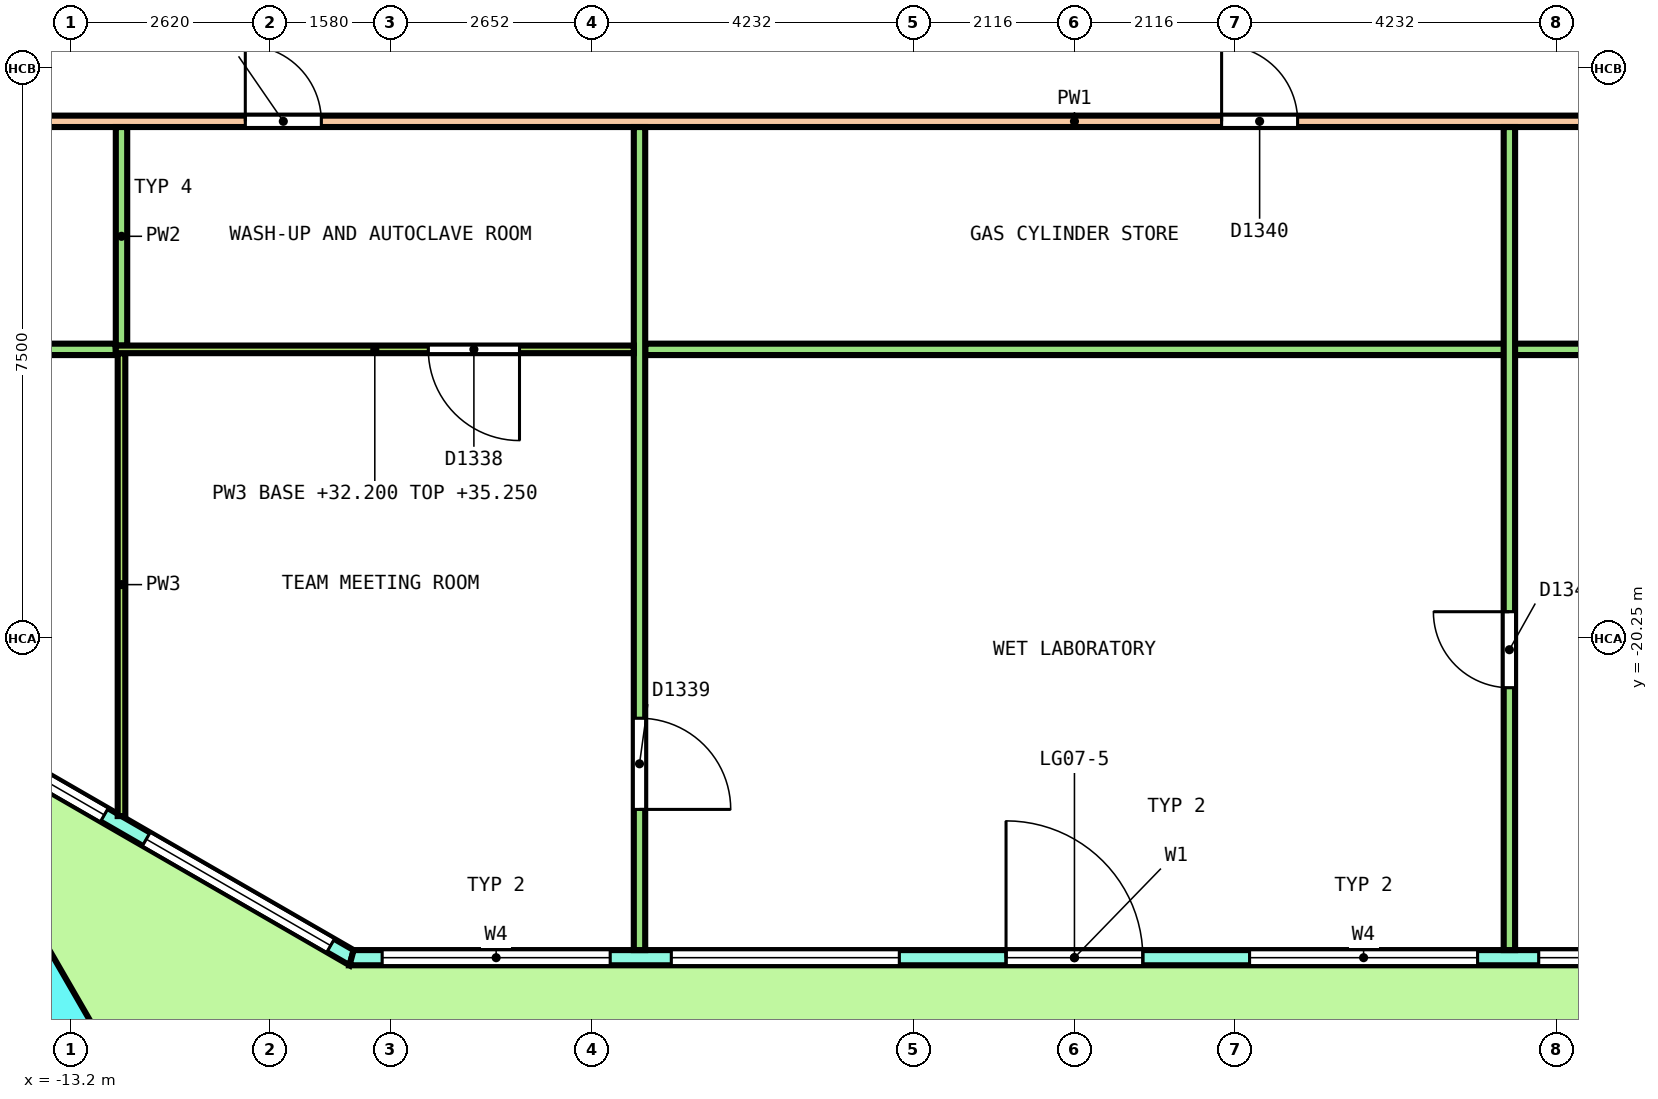
"""IFC4 building model, lengths in metres.
Left out: names, types, materials, properties, quantities, classifications, styles, units other than length and angle.
Written with IfcOpenShell. Run it as: python <this file> out.ifc"""

import sys

from ifc_helpers import new_model, si_unit, direction, frame, frame_2d, origin, origin_2d, place, context, subcontext, project, spatial, polyline, rectangle, outline, extrude, element, fill, save


model = new_model("IFC4")
c1 = context("Model", 3, precision=1e-05, world=origin(), true_north=direction((0.0, 1.0)))
c2 = subcontext(c1, "Body", "Model", "MODEL_VIEW")
j1 = project(units=[si_unit("LENGTHUNIT", "METRE"), si_unit("PLANEANGLEUNIT", "RADIAN")], contexts=[c1])
p1 = place(None, origin())
s1 = spatial("IfcSite", under=j1, at=p1, CompositionType="ELEMENT")
p2 = place(p1, origin())
s2 = spatial("IfcBuilding", under=s1, at=p2, CompositionType="ELEMENT")
p3 = place(p2, frame((0.0, 0.0, 32.2)))
s3 = spatial("IfcBuildingStorey", under=s2, at=p3, CompositionType="ELEMENT", Elevation=32.2)
p4 = place(p3, frame((-13.887, -25.159, 0.0), z_axis=(0.018132595726, -0.031445896907, 0.999340965106), x_axis=(0.865469370655, -0.499974541214, -0.031436071558)))
e1 = element("IfcColumn", 1, at=p4, inside=s3, PredefinedType="COLUMN", context=c2, shape_type="SweptSolid", body=[
    extrude(rectangle(XDim=1.5, YDim=1.5, at=origin_2d()), origin(), (0.0, 0.0, 1.0), 4.053),
])
p5 = place(p3, frame((-15.464, -21.016, 0.0), z_axis=(0.0, 0.0, 1.0), x_axis=(0.866029458321, -0.49999297727, 0.0)))
e2 = element("IfcWall", 2, at=p5, inside=s3, PredefinedType="SOLIDWALL", context=c2, shape_type="SweptSolid", body=[
    extrude(outline(polyline([(-0.027, -0.1), (1.128, -0.1), (2.282, -0.1), (3.437, -0.1), (4.592, -0.1), (5.747, -0.1), (6.901, -0.1), (6.848, 0.1), (5.711, 0.1), (4.574, 0.1), (3.437, 0.1), (2.301, 0.1), (1.164, 0.1), (0.027, 0.1), (-0.027, -0.1)])), origin(), (0.0, 0.0, 1.0), 4.1),
])
p6 = place(p5, frame((0.319, 0.0, 0.1)))
e3 = element("IfcOpeningElement", 3, at=p6, cuts=e2, PredefinedType="OPENING", context=c2, shape_type="SweptSolid", body=[
    extrude(rectangle(XDim=2.8, YDim=2.9, at=frame_2d((1.4, 1.45))), frame((0.0, 0.11, 0.0), z_axis=(0.0, -1.0, 0.0), x_axis=(1.0, 0.0, 0.0)), (0.0, 0.0, 1.0), 0.22),
])
p7 = place(p5, frame((3.756, 0.0, 0.1)))
e4 = element("IfcOpeningElement", 4, at=p7, cuts=e2, PredefinedType="OPENING", context=c2, shape_type="SweptSolid", body=[
    extrude(rectangle(XDim=2.8, YDim=2.9, at=frame_2d((1.4, 1.45))), frame((0.0, 0.11, 0.0), z_axis=(0.0, -1.0, 0.0), x_axis=(1.0, 0.0, 0.0)), (0.0, 0.0, 1.0), 0.22),
])
p8 = place(p3, frame((-9.51, -24.453, 0.0), z_axis=(0.0, 0.0, 1.0), x_axis=(1.0, 0.0, 0.0)))
e5 = element("IfcWall", 5, at=p8, inside=s3, PredefinedType="SOLIDWALL", context=c2, shape_type="SweptSolid", body=[
    extrude(outline(polyline([(-0.027, -0.1), (0.977, -0.1), (1.981, -0.1), (2.985, -0.1), (3.989, -0.1), (4.993, -0.1), (5.997, -0.1), (7.0, -0.1), (8.004, -0.1), (9.008, -0.1), (10.012, -0.1), (11.016, -0.1), (12.02, -0.1), (13.024, -0.1), (14.028, -0.1), (15.032, -0.1), (16.036, -0.1), (17.04, -0.1), (18.043, -0.1), (19.047, -0.1), (18.994, 0.1), (17.995, 0.1), (16.997, 0.1), (15.999, 0.1), (15.001, 0.1), (14.002, 0.1), (13.004, 0.1), (12.006, 0.1), (11.008, 0.1), (10.009, 0.1), (9.011, 0.1), (8.013, 0.1), (7.015, 0.1), (6.016, 0.1), (5.018, 0.1), (4.02, 0.1), (3.022, 0.1), (2.023, 0.1), (1.025, 0.1), (0.027, 0.1), (-0.027, -0.1)])), origin(), (0.0, 0.0, 1.0), 4.1),
])
p9 = place(p8, frame((0.402, 0.0, 0.1)))
e6 = element("IfcOpeningElement", 6, at=p9, cuts=e5, PredefinedType="OPENING", context=c2, shape_type="SweptSolid", body=[
    extrude(rectangle(XDim=3.0, YDim=2.9, at=frame_2d((1.5, 1.45))), frame((0.0, 0.11, 0.0), z_axis=(0.0, -1.0, 0.0), x_axis=(1.0, 0.0, 0.0)), (0.0, 0.0, 1.0), 0.22),
])
p10 = place(p8, frame((4.206, 0.0, 0.1)))
e7 = element("IfcOpeningElement", 7, at=p10, cuts=e5, PredefinedType="OPENING", context=c2, shape_type="SweptSolid", body=[
    extrude(rectangle(XDim=3.0, YDim=2.9, at=frame_2d((1.5, 1.45))), frame((0.0, 0.11, 0.0), z_axis=(0.0, -1.0, 0.0), x_axis=(1.0, 0.0, 0.0)), (0.0, 0.0, 1.0), 0.22),
])
p11 = place(p8, frame((8.61, 0.0, 0.0)))
e8 = element("IfcOpeningElement", 8, at=p11, cuts=e5, PredefinedType="OPENING", context=c2, shape_type="SweptSolid", body=[
    extrude(rectangle(XDim=1.8, YDim=2.4, at=frame_2d((0.9, 1.2))), frame((0.0, 0.11, 0.0), z_axis=(0.0, -1.0, 0.0), x_axis=(1.0, 0.0, 0.0)), (0.0, 0.0, 1.0), 0.22),
])
p12 = place(p8, frame((8.61, 0.0, 2.55)))
e9 = element("IfcOpeningElement", 9, at=p12, cuts=e5, PredefinedType="OPENING", context=c2, shape_type="SweptSolid", body=[
    extrude(rectangle(XDim=1.8, YDim=0.45, at=frame_2d((0.9, 0.225))), frame((0.0, 0.11, 0.0), z_axis=(0.0, -1.0, 0.0), x_axis=(1.0, 0.0, 0.0)), (0.0, 0.0, 1.0), 0.22),
])
p13 = place(p8, frame((11.814, 0.0, 0.1)))
e10 = element("IfcOpeningElement", 10, at=p13, cuts=e5, PredefinedType="OPENING", context=c2, shape_type="SweptSolid", body=[
    extrude(rectangle(XDim=3.0, YDim=2.9, at=frame_2d((1.5, 1.45))), frame((0.0, 0.11, 0.0), z_axis=(0.0, -1.0, 0.0), x_axis=(1.0, 0.0, 0.0)), (0.0, 0.0, 1.0), 0.22),
])
p14 = place(p8, frame((15.618, 0.0, 0.1)))
e11 = element("IfcOpeningElement", 11, at=p14, cuts=e5, PredefinedType="OPENING", context=c2, shape_type="SweptSolid", body=[
    extrude(rectangle(XDim=3.0, YDim=2.9, at=frame_2d((1.5, 1.45))), frame((0.0, 0.11, 0.0), z_axis=(0.0, -1.0, 0.0), x_axis=(1.0, 0.0, 0.0)), (0.0, 0.0, 1.0), 0.22),
])
p15 = place(p3, frame((-15.925, -13.45, 0.0), z_axis=(0.0, 0.0, 1.0), x_axis=(1.0, 0.0, 0.0)))
e12 = element("IfcWall", 12, at=p15, inside=s3, PredefinedType="PARTITIONING", context=c2, shape_type="SweptSolid", body=[
    extrude(rectangle(XDim=31.85, YDim=0.15, at=frame_2d((15.925, 0.0))), origin(), (0.0, 0.0, 1.0), 3.05),
])
p16 = place(p15, frame((0.828, 0.0, 0.0)))
e13 = element("IfcOpeningElement", 13, at=p16, cuts=e12, PredefinedType="OPENING", context=c2, shape_type="SweptSolid", body=[
    extrude(rectangle(XDim=1.0, YDim=2.1, at=frame_2d((0.5, 1.05))), frame((0.0, 0.085, 0.0), z_axis=(0.0, -1.0, 0.0), x_axis=(1.0, 0.0, 0.0)), (0.0, 0.0, 1.0), 0.17),
])
p17 = place(p15, frame((5.017, 0.0, 0.0)))
e14 = element("IfcOpeningElement", 14, at=p17, cuts=e12, PredefinedType="OPENING", context=c2, shape_type="SweptSolid", body=[
    extrude(rectangle(XDim=1.0, YDim=2.1, at=frame_2d((0.5, 1.05))), frame((0.0, 0.085, 0.0), z_axis=(0.0, -1.0, 0.0), x_axis=(1.0, 0.0, 0.0)), (0.0, 0.0, 1.0), 0.17),
])
p18 = place(p15, frame((17.861, 0.0, 0.0)))
e15 = element("IfcOpeningElement", 15, at=p18, cuts=e12, PredefinedType="OPENING", context=c2, shape_type="SweptSolid", body=[
    extrude(rectangle(XDim=1.0, YDim=2.1, at=frame_2d((0.5, 1.05))), frame((0.0, 0.085, 0.0), z_axis=(0.0, -1.0, 0.0), x_axis=(1.0, 0.0, 0.0)), (0.0, 0.0, 1.0), 0.17),
])
p19 = place(p15, frame((24.837, 0.0, 0.0)))
e16 = element("IfcOpeningElement", 16, at=p19, cuts=e12, PredefinedType="OPENING", context=c2, shape_type="SweptSolid", body=[
    extrude(rectangle(XDim=1.0, YDim=2.1, at=frame_2d((0.5, 1.05))), frame((0.0, 0.085, 0.0), z_axis=(0.0, -1.0, 0.0), x_axis=(1.0, 0.0, 0.0)), (0.0, 0.0, 1.0), 0.17),
])
p20 = place(p3, frame((-17.985, -16.45, 0.0), z_axis=(0.0, 0.0, 1.0), x_axis=(1.0, 0.0, 0.0)))
e17 = element("IfcWall", 17, at=p20, inside=s3, PredefinedType="PARTITIONING", context=c2, shape_type="SweptSolid", body=[
    extrude(rectangle(XDim=5.373, YDim=0.15, at=frame_2d((2.686, 0.0))), origin(), (0.0, 0.0, 1.0), 3.05),
])
p21 = place(p20, frame((2.224, 0.0, 0.0)))
e18 = element("IfcOpeningElement", 18, at=p21, cuts=e17, PredefinedType="OPENING", context=c2, shape_type="SweptSolid", body=[
    extrude(rectangle(XDim=1.0, YDim=2.1, at=frame_2d((0.5, 1.05))), frame((0.0, 0.085, 0.0), z_axis=(0.0, -1.0, 0.0), x_axis=(1.0, 0.0, 0.0)), (0.0, 0.0, 1.0), 0.17),
])
p22 = place(p3, frame((-5.647, -16.45, 0.0), z_axis=(0.0, 0.0, 1.0), x_axis=(1.0, 0.0, 0.0)))
e19 = element("IfcWall", 19, at=p22, inside=s3, PredefinedType="PARTITIONING", context=c2, shape_type="SweptSolid", body=[
    extrude(rectangle(XDim=21.109, YDim=0.15, at=frame_2d((10.555, 0.0))), origin(), (0.0, 0.0, 1.0), 3.05),
])
p23 = place(p3, frame((-12.537, -16.4, 0.0), z_axis=(0.0, 0.0, 1.0), x_axis=(0.0, 1.0, 0.0)))
e20 = element("IfcWall", 20, at=p23, inside=s3, PredefinedType="PARTITIONING", context=c2, shape_type="SweptSolid", body=[
    extrude(rectangle(XDim=2.875, YDim=0.15, at=frame_2d((1.438, 0.0))), origin(), (0.0, 0.0, 1.0), 3.05),
])
p24 = place(p3, frame((-5.722, -24.353, 0.0), z_axis=(0.0, 0.0, 1.0), x_axis=(0.0, 1.0, 0.0)))
e21 = element("IfcWall", 21, at=p24, inside=s3, PredefinedType="PARTITIONING", context=c2, shape_type="SweptSolid", body=[
    extrude(rectangle(XDim=10.828, YDim=0.15, at=frame_2d((5.414, 0.0))), origin(), (0.0, 0.0, 1.0), 3.05),
])
p25 = place(p24, frame((1.851, 0.0, 0.0)))
e22 = element("IfcOpeningElement", 22, at=p25, cuts=e21, PredefinedType="OPENING", context=c2, shape_type="SweptSolid", body=[
    extrude(rectangle(XDim=1.2, YDim=2.1, at=frame_2d((0.6, 1.05))), frame((0.0, 0.085, 0.0), z_axis=(0.0, -1.0, 0.0), x_axis=(1.0, 0.0, 0.0)), (0.0, 0.0, 1.0), 0.17),
])
p26 = place(p3, frame((5.722, -24.353, 0.0), z_axis=(0.0, 0.0, 1.0), x_axis=(0.0, 1.0, 0.0)))
e23 = element("IfcWall", 23, at=p26, inside=s3, PredefinedType="PARTITIONING", context=c2, shape_type="SweptSolid", body=[
    extrude(rectangle(XDim=10.828, YDim=0.15, at=frame_2d((5.414, 0.0))), origin(), (0.0, 0.0, 1.0), 3.05),
])
p27 = place(p26, frame((3.452, 0.0, 0.0)))
e24 = element("IfcOpeningElement", 24, at=p27, cuts=e23, PredefinedType="OPENING", context=c2, shape_type="SweptSolid", body=[
    extrude(rectangle(XDim=1.0, YDim=2.1, at=frame_2d((0.5, 1.05))), frame((0.0, 0.085, 0.0), z_axis=(0.0, -1.0, 0.0), x_axis=(1.0, 0.0, 0.0)), (0.0, 0.0, 1.0), 0.17),
])
p28 = place(p3, frame((-12.537, -22.59, 0.0), z_axis=(0.0, 0.0, 1.0), x_axis=(0.0, 1.0, 0.0)))
e25 = element("IfcWall", 25, at=p28, inside=s3, PredefinedType="PARTITIONING", context=c2, shape_type="SweptSolid", body=[
    extrude(rectangle(XDim=6.09, YDim=0.1, at=frame_2d((3.045, 0.0))), origin(), (0.0, 0.0, 1.0), 3.05),
])
p29 = place(p3, frame((-12.612, -16.45, 0.0), z_axis=(0.0, 0.0, 1.0), x_axis=(1.0, 0.0, 0.0)))
e26 = element("IfcWall", 26, at=p29, inside=s3, PredefinedType="PARTITIONING", context=c2, shape_type="SweptSolid", body=[
    extrude(rectangle(XDim=6.815, YDim=0.1, at=frame_2d((3.407, 0.0))), origin(), (0.0, 0.0, 1.0), 3.05),
])
p30 = place(p29, frame((4.111, 0.0, 0.0)))
e27 = element("IfcOpeningElement", 27, at=p30, cuts=e26, PredefinedType="OPENING", context=c2, shape_type="SweptSolid", body=[
    extrude(rectangle(XDim=1.2, YDim=2.1, at=frame_2d((0.6, 1.05))), frame((0.0, 0.06, 0.0), z_axis=(0.0, -1.0, 0.0), x_axis=(1.0, 0.0, 0.0)), (0.0, 0.0, 1.0), 0.12),
])
p31 = place(p6, origin())
e28 = element("IfcWindow", 28, at=p31, inside=s3, PartitioningType="SINGLE_PANEL", PredefinedType="WINDOW", context=c2, shape_type="SweptSolid", body=[
    extrude(rectangle(XDim=2.8, YDim=2.9, at=frame_2d((1.4, 1.45))), frame((0.0, 0.03, 0.0), z_axis=(0.0, -1.0, 0.0), x_axis=(1.0, 0.0, 0.0)), (0.0, 0.0, 1.0), 0.06),
])
fill(e3, e28)
p32 = place(p7, origin())
e29 = element("IfcWindow", 29, at=p32, inside=s3, PartitioningType="SINGLE_PANEL", PredefinedType="WINDOW", context=c2, shape_type="SweptSolid", body=[
    extrude(rectangle(XDim=2.8, YDim=2.9, at=frame_2d((1.4, 1.45))), frame((0.0, 0.03, 0.0), z_axis=(0.0, -1.0, 0.0), x_axis=(1.0, 0.0, 0.0)), (0.0, 0.0, 1.0), 0.06),
])
fill(e4, e29)
p33 = place(p9, origin())
e30 = element("IfcWindow", 30, at=p33, inside=s3, PartitioningType="SINGLE_PANEL", PredefinedType="WINDOW", context=c2, shape_type="SweptSolid", body=[
    extrude(rectangle(XDim=3.0, YDim=2.9, at=frame_2d((1.5, 1.45))), frame((0.0, 0.03, 0.0), z_axis=(0.0, -1.0, 0.0), x_axis=(1.0, 0.0, 0.0)), (0.0, 0.0, 1.0), 0.06),
])
fill(e6, e30)
p34 = place(p10, origin())
e31 = element("IfcWindow", 31, at=p34, inside=s3, PartitioningType="SINGLE_PANEL", PredefinedType="WINDOW", context=c2, shape_type="SweptSolid", body=[
    extrude(rectangle(XDim=3.0, YDim=2.9, at=frame_2d((1.5, 1.45))), frame((0.0, 0.03, 0.0), z_axis=(0.0, -1.0, 0.0), x_axis=(1.0, 0.0, 0.0)), (0.0, 0.0, 1.0), 0.06),
])
fill(e7, e31)
p35 = place(p11, origin())
e32 = element("IfcDoor", 32, at=p35, inside=s3, OperationType="DOUBLE_DOOR_SINGLE_SWING", PredefinedType="DOOR", context=c2, shape_type="SweptSolid", body=[
    extrude(rectangle(XDim=1.8, YDim=2.4, at=frame_2d((0.9, 1.2))), frame((0.0, 0.025, 0.0), z_axis=(0.0, -1.0, 0.0), x_axis=(1.0, 0.0, 0.0)), (0.0, 0.0, 1.0), 0.05),
])
fill(e8, e32)
p36 = place(p12, origin())
e33 = element("IfcWindow", 33, at=p36, inside=s3, PartitioningType="SINGLE_PANEL", PredefinedType="WINDOW", context=c2, shape_type="SweptSolid", body=[
    extrude(rectangle(XDim=1.8, YDim=0.45, at=frame_2d((0.9, 0.225))), frame((0.0, 0.03, 0.0), z_axis=(0.0, -1.0, 0.0), x_axis=(1.0, 0.0, 0.0)), (0.0, 0.0, 1.0), 0.06),
])
fill(e9, e33)
p37 = place(p13, origin())
e34 = element("IfcWindow", 34, at=p37, inside=s3, PartitioningType="SINGLE_PANEL", PredefinedType="WINDOW", context=c2, shape_type="SweptSolid", body=[
    extrude(rectangle(XDim=3.0, YDim=2.9, at=frame_2d((1.5, 1.45))), frame((0.0, 0.03, 0.0), z_axis=(0.0, -1.0, 0.0), x_axis=(1.0, 0.0, 0.0)), (0.0, 0.0, 1.0), 0.06),
])
fill(e10, e34)
p38 = place(p14, origin())
e35 = element("IfcWindow", 35, at=p38, inside=s3, PartitioningType="SINGLE_PANEL", PredefinedType="WINDOW", context=c2, shape_type="SweptSolid", body=[
    extrude(rectangle(XDim=3.0, YDim=2.9, at=frame_2d((1.5, 1.45))), frame((0.0, 0.03, 0.0), z_axis=(0.0, -1.0, 0.0), x_axis=(1.0, 0.0, 0.0)), (0.0, 0.0, 1.0), 0.06),
])
fill(e11, e35)
p39 = place(p17, origin())
e36 = element("IfcDoor", 36, at=p39, inside=s3, OperationType="SINGLE_SWING_RIGHT", PredefinedType="DOOR", context=c2, shape_type="SweptSolid", body=[
    extrude(rectangle(XDim=1.0, YDim=2.1, at=frame_2d((0.5, 1.05))), frame((0.0, 0.025, 0.0), z_axis=(0.0, -1.0, 0.0), x_axis=(1.0, 0.0, 0.0)), (0.0, 0.0, 1.0), 0.05),
])
fill(e14, e36)
p40 = place(p30, origin())
e37 = element("IfcDoor", 37, at=p40, inside=s3, OperationType="DOUBLE_DOOR_SINGLE_SWING", PredefinedType="DOOR", context=c2, shape_type="SweptSolid", body=[
    extrude(rectangle(XDim=1.2, YDim=2.1, at=frame_2d((0.6, 1.05))), frame((0.0, 0.025, 0.0), z_axis=(0.0, -1.0, 0.0), x_axis=(1.0, 0.0, 0.0)), (0.0, 0.0, 1.0), 0.05),
])
fill(e27, e37)
p41 = place(p25, origin())
e38 = element("IfcDoor", 38, at=p41, inside=s3, OperationType="DOUBLE_DOOR_SINGLE_SWING", PredefinedType="DOOR", context=c2, shape_type="SweptSolid", body=[
    extrude(rectangle(XDim=1.2, YDim=2.1, at=frame_2d((0.6, 1.05))), frame((0.0, 0.025, 0.0), z_axis=(0.0, -1.0, 0.0), x_axis=(1.0, 0.0, 0.0)), (0.0, 0.0, 1.0), 0.05),
])
fill(e22, e38)
p42 = place(p18, origin())
e39 = element("IfcDoor", 39, at=p42, inside=s3, OperationType="SINGLE_SWING_RIGHT", PredefinedType="DOOR", context=c2, shape_type="SweptSolid", body=[
    extrude(rectangle(XDim=1.0, YDim=2.1, at=frame_2d((0.5, 1.05))), frame((0.0, 0.025, 0.0), z_axis=(0.0, -1.0, 0.0), x_axis=(1.0, 0.0, 0.0)), (0.0, 0.0, 1.0), 0.05),
])
fill(e15, e39)
p43 = place(p27, origin())
e40 = element("IfcDoor", 40, at=p43, inside=s3, OperationType="SINGLE_SWING_RIGHT", PredefinedType="DOOR", context=c2, shape_type="SweptSolid", body=[
    extrude(rectangle(XDim=1.0, YDim=2.1, at=frame_2d((0.5, 1.05))), frame((0.0, 0.025, 0.0), z_axis=(0.0, -1.0, 0.0), x_axis=(1.0, 0.0, 0.0)), (0.0, 0.0, 1.0), 0.05),
])
fill(e24, e40)
save(model, sys.argv[1])
